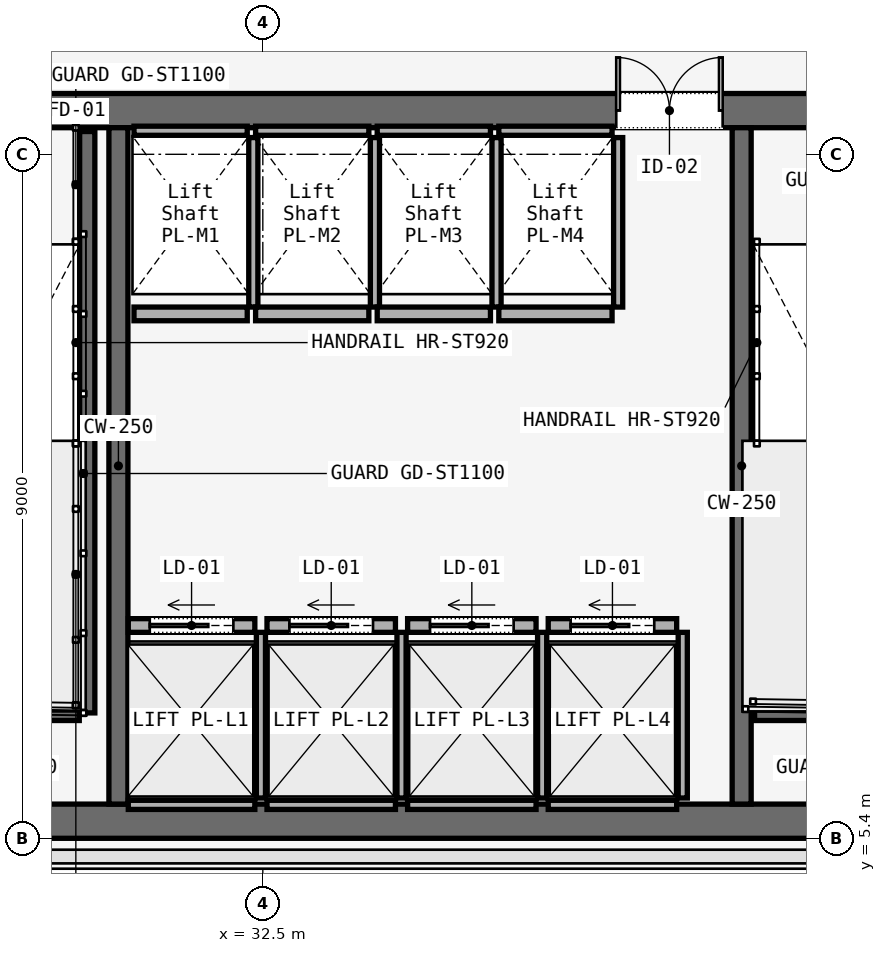
"""IFC4 building model, lengths in metres.
Left out: names, types, materials, properties, quantities, classifications, styles, units other than length and angle.
Written with IfcOpenShell. Run it as: python <this file> out.ifc"""

import sys

from ifc_helpers import new_model, si_unit, direction, frame, frame_2d, origin, place, context, subcontext, project, spatial, rectangle, extrude, element, fill, save


model = new_model("IFC4")
c1 = context("Model", 3, precision=1e-05, world=origin(), true_north=direction((0.0, 1.0)))
c2 = subcontext(c1, "Body", "Model", "MODEL_VIEW")
j1 = project(units=[si_unit("LENGTHUNIT", "METRE"), si_unit("PLANEANGLEUNIT", "RADIAN")], contexts=[c1])
p1 = place(None, origin())
s1 = spatial("IfcSite", under=j1, at=p1, CompositionType="ELEMENT")
p2 = place(p1, origin())
s2 = spatial("IfcBuilding", under=s1, at=p2, CompositionType="ELEMENT")
p3 = place(p2, frame((0.0, 0.0, 74.0)))
s3 = spatial("IfcBuildingStorey", under=s2, at=p3, CompositionType="ELEMENT", Elevation=74.0)
p4 = place(p3, frame((26.45, 14.975, 0.0), z_axis=(0.0, 0.0, 1.0), x_axis=(1.0, 0.0, 0.0)))
e1 = element("IfcWall", 1, at=p4, inside=s3, PredefinedType="SOLIDWALL", context=c2, shape_type="SweptSolid", body=[
    extrude(rectangle(XDim=31.1, YDim=0.45, at=frame_2d((15.55, 0.0))), origin(), (0.0, 0.0, 1.0), 3.58),
])
p5 = place(p4, frame((1.65, 0.0, 0.0)))
e2 = element("IfcOpeningElement", 2, at=p5, cuts=e1, PredefinedType="OPENING", context=c2, shape_type="SweptSolid", body=[
    extrude(rectangle(XDim=1.1, YDim=2.2, at=frame_2d((0.55, 1.1))), frame((0.0, 0.225, 0.0), z_axis=(0.0, -1.0, 0.0), x_axis=(1.0, 0.0, 0.0)), (0.0, 0.0, 1.0), 0.45),
])
p6 = place(p4, frame((13.65, 0.0, 0.0)))
e3 = element("IfcOpeningElement", 3, at=p6, cuts=e1, PredefinedType="OPENING", context=c2, shape_type="SweptSolid", body=[
    extrude(rectangle(XDim=1.1, YDim=2.2, at=frame_2d((0.55, 1.1))), frame((0.0, 0.225, 0.0), z_axis=(0.0, -1.0, 0.0), x_axis=(1.0, 0.0, 0.0)), (0.0, 0.0, 1.0), 0.45),
])
p7 = place(p4, frame((25.55, 0.0, 0.0)))
e4 = element("IfcOpeningElement", 4, at=p7, cuts=e1, PredefinedType="OPENING", context=c2, shape_type="SweptSolid", body=[
    extrude(rectangle(XDim=1.1, YDim=2.2, at=frame_2d((0.55, 1.1))), frame((0.0, 0.225, 0.0), z_axis=(0.0, -1.0, 0.0), x_axis=(1.0, 0.0, 0.0)), (0.0, 0.0, 1.0), 0.45),
])
p8 = place(p4, frame((10.7, 0.0, 0.0)))
e5 = element("IfcOpeningElement", 5, at=p8, cuts=e1, PredefinedType="OPENING", context=c2, shape_type="SweptSolid", body=[
    extrude(rectangle(XDim=1.4, YDim=2.2, at=frame_2d((0.7, 1.1))), frame((0.0, 0.225, 0.0), z_axis=(0.0, -1.0, 0.0), x_axis=(1.0, 0.0, 0.0)), (0.0, 0.0, 1.0), 0.45),
])
p9 = place(p4, frame((19.35, 0.0, 0.0)))
e6 = element("IfcOpeningElement", 6, at=p9, cuts=e1, PredefinedType="OPENING", context=c2, shape_type="SweptSolid", body=[
    extrude(rectangle(XDim=1.1, YDim=2.2, at=frame_2d((0.55, 1.1))), frame((0.0, 0.225, 0.0), z_axis=(0.0, -1.0, 0.0), x_axis=(1.0, 0.0, 0.0)), (0.0, 0.0, 1.0), 0.45),
])
p10 = place(p4, frame((21.4, 0.0, 0.0)))
e7 = element("IfcOpeningElement", 7, at=p10, cuts=e1, PredefinedType="OPENING", context=c2, shape_type="SweptSolid", body=[
    extrude(rectangle(XDim=0.9, YDim=2.1, at=frame_2d((0.45, 1.05))), frame((0.0, 0.225, 0.0), z_axis=(0.0, -1.0, 0.0), x_axis=(1.0, 0.0, 0.0)), (0.0, 0.0, 1.0), 0.45),
])
p11 = place(p4, frame((23.35, 0.0, 0.0)))
e8 = element("IfcOpeningElement", 8, at=p11, cuts=e1, PredefinedType="OPENING", context=c2, shape_type="SweptSolid", body=[
    extrude(rectangle(XDim=1.3, YDim=2.3, at=frame_2d((0.65, 1.15))), frame((0.0, 0.225, 0.0), z_axis=(0.0, -1.0, 0.0), x_axis=(1.0, 0.0, 0.0)), (0.0, 0.0, 1.0), 0.45),
])
p12 = place(p3, frame((26.45, 5.625, 0.0), z_axis=(0.0, 0.0, 1.0), x_axis=(1.0, 0.0, 0.0)))
e9 = element("IfcWall", 9, at=p12, inside=s3, PredefinedType="SOLIDWALL", context=c2, shape_type="SweptSolid", body=[
    extrude(rectangle(XDim=31.1, YDim=0.45, at=frame_2d((15.55, 0.0))), origin(), (0.0, 0.0, 1.0), 3.58),
])
for number, where, z_axis, x_axis in (
    (10, (30.6, 5.85, 0.0), (0.0, 0.0, 1.0), (0.0, 1.0, 0.0)),
    (11, (38.8, 5.85, 0.0), (0.0, 0.0, 1.0), (0.0, 1.0, 0.0)),
):
    element("IfcWall", number, at=place(p3, frame(where, z_axis=z_axis, x_axis=x_axis)), inside=s3, PredefinedType="SOLIDWALL", context=c2, shape_type="SweptSolid", body=[
        extrude(rectangle(XDim=8.9, YDim=0.25, at=frame_2d((4.45, 0.0))), origin(), (0.0, 0.0, 1.0), 3.58),
    ])
p13 = place(p3, frame((30.19, 14.7, 0.0), z_axis=(0.0, 0.0, 1.0), x_axis=(0.0, -1.0, 0.0)))
e12 = element("IfcWall", 12, at=p13, inside=s3, PredefinedType="SOLIDWALL", context=c2, shape_type="SweptSolid", body=[
    extrude(rectangle(XDim=7.65, YDim=0.2, at=frame_2d((3.825, 0.0))), origin(), (0.0, 0.0, 1.0), 3.8),
])
for number, where, z_axis, x_axis in (
    (13, (26.97, 7.05, 0.0), (0.0, 0.0, 1.0), (1.0, 0.0, 0.0)),
    (14, (38.97, 7.05, 0.0), (0.0, 0.0, 1.0), (1.0, 0.0, 0.0)),
):
    element("IfcWall", number, at=place(p3, frame(where, z_axis=z_axis, x_axis=x_axis)), inside=s3, PredefinedType="SOLIDWALL", context=c2, shape_type="SweptSolid", body=[
        extrude(rectangle(XDim=3.115, YDim=0.2, at=frame_2d((1.558, 0.0))), origin(), (0.0, 0.0, 1.0), 3.8),
    ])
p14 = place(p3, frame((30.73, 8.2, 0.0), z_axis=(0.0, 0.0, 1.0), x_axis=(1.0, 0.0, 0.0)))
e15 = element("IfcWall", 15, at=p14, inside=s3, PredefinedType="SOLIDWALL", context=c2, shape_type="SweptSolid", body=[
    extrude(rectangle(XDim=1.665, YDim=0.18, at=frame_2d((0.833, 0.0))), origin(), (0.0, 0.0, 1.0), 2.95),
])
p15 = place(p14, frame((0.282, 0.0, 0.0)))
e16 = element("IfcOpeningElement", 16, at=p15, cuts=e15, PredefinedType="OPENING", context=c2, shape_type="SweptSolid", body=[
    extrude(rectangle(XDim=1.1, YDim=2.2, at=frame_2d((0.55, 1.1))), frame((0.0, 0.09, 0.0), z_axis=(0.0, -1.0, 0.0), x_axis=(1.0, 0.0, 0.0)), (0.0, 0.0, 1.0), 0.18),
])
p16 = place(p3, frame((30.73, 5.84, 0.0), z_axis=(0.0, 0.0, 1.0), x_axis=(1.0, 0.0, 0.0)))
e17 = element("IfcWall", 17, at=p16, inside=s3, PredefinedType="SOLIDWALL", context=c2, shape_type="SweptSolid", body=[
    extrude(rectangle(XDim=1.665, YDim=0.12, at=frame_2d((0.833, 0.0))), origin(), (0.0, 0.0, 1.0), 2.95),
])
p17 = place(p3, frame((32.475, 5.93, 0.0), z_axis=(0.0, 0.0, 1.0), x_axis=(0.0, 1.0, 0.0)))
e18 = element("IfcWall", 18, at=p17, inside=s3, PredefinedType="SOLIDWALL", context=c2, shape_type="SweptSolid", body=[
    extrude(rectangle(XDim=2.18, YDim=0.12, at=frame_2d((1.09, 0.0))), origin(), (0.0, 0.0, 1.0), 2.95),
])
p18 = place(p3, frame((32.555, 8.2, 0.0), z_axis=(0.0, 0.0, 1.0), x_axis=(1.0, 0.0, 0.0)))
e19 = element("IfcWall", 19, at=p18, inside=s3, PredefinedType="SOLIDWALL", context=c2, shape_type="SweptSolid", body=[
    extrude(rectangle(XDim=1.69, YDim=0.18, at=frame_2d((0.845, 0.0))), origin(), (0.0, 0.0, 1.0), 2.95),
])
p19 = place(p18, frame((0.295, 0.0, 0.0)))
e20 = element("IfcOpeningElement", 20, at=p19, cuts=e19, PredefinedType="OPENING", context=c2, shape_type="SweptSolid", body=[
    extrude(rectangle(XDim=1.1, YDim=2.2, at=frame_2d((0.55, 1.1))), frame((0.0, 0.09, 0.0), z_axis=(0.0, -1.0, 0.0), x_axis=(1.0, 0.0, 0.0)), (0.0, 0.0, 1.0), 0.18),
])
p20 = place(p3, frame((32.555, 5.84, 0.0), z_axis=(0.0, 0.0, 1.0), x_axis=(1.0, 0.0, 0.0)))
e21 = element("IfcWall", 21, at=p20, inside=s3, PredefinedType="SOLIDWALL", context=c2, shape_type="SweptSolid", body=[
    extrude(rectangle(XDim=1.69, YDim=0.12, at=frame_2d((0.845, 0.0))), origin(), (0.0, 0.0, 1.0), 2.95),
])
p21 = place(p3, frame((34.325, 5.93, 0.0), z_axis=(0.0, 0.0, 1.0), x_axis=(0.0, 1.0, 0.0)))
e22 = element("IfcWall", 22, at=p21, inside=s3, PredefinedType="SOLIDWALL", context=c2, shape_type="SweptSolid", body=[
    extrude(rectangle(XDim=2.18, YDim=0.12, at=frame_2d((1.09, 0.0))), origin(), (0.0, 0.0, 1.0), 2.95),
])
p22 = place(p3, frame((34.405, 8.2, 0.0), z_axis=(0.0, 0.0, 1.0), x_axis=(1.0, 0.0, 0.0)))
e23 = element("IfcWall", 23, at=p22, inside=s3, PredefinedType="SOLIDWALL", context=c2, shape_type="SweptSolid", body=[
    extrude(rectangle(XDim=1.69, YDim=0.18, at=frame_2d((0.845, 0.0))), origin(), (0.0, 0.0, 1.0), 2.95),
])
p23 = place(p22, frame((0.295, 0.0, 0.0)))
e24 = element("IfcOpeningElement", 24, at=p23, cuts=e23, PredefinedType="OPENING", context=c2, shape_type="SweptSolid", body=[
    extrude(rectangle(XDim=1.1, YDim=2.2, at=frame_2d((0.55, 1.1))), frame((0.0, 0.09, 0.0), z_axis=(0.0, -1.0, 0.0), x_axis=(1.0, 0.0, 0.0)), (0.0, 0.0, 1.0), 0.18),
])
p24 = place(p3, frame((34.405, 5.84, 0.0), z_axis=(0.0, 0.0, 1.0), x_axis=(1.0, 0.0, 0.0)))
e25 = element("IfcWall", 25, at=p24, inside=s3, PredefinedType="SOLIDWALL", context=c2, shape_type="SweptSolid", body=[
    extrude(rectangle(XDim=1.69, YDim=0.12, at=frame_2d((0.845, 0.0))), origin(), (0.0, 0.0, 1.0), 2.95),
])
p25 = place(p3, frame((36.175, 5.93, 0.0), z_axis=(0.0, 0.0, 1.0), x_axis=(0.0, 1.0, 0.0)))
e26 = element("IfcWall", 26, at=p25, inside=s3, PredefinedType="SOLIDWALL", context=c2, shape_type="SweptSolid", body=[
    extrude(rectangle(XDim=2.18, YDim=0.12, at=frame_2d((1.09, 0.0))), origin(), (0.0, 0.0, 1.0), 2.95),
])
p26 = place(p3, frame((36.255, 8.2, 0.0), z_axis=(0.0, 0.0, 1.0), x_axis=(1.0, 0.0, 0.0)))
e27 = element("IfcWall", 27, at=p26, inside=s3, PredefinedType="SOLIDWALL", context=c2, shape_type="SweptSolid", body=[
    extrude(rectangle(XDim=1.69, YDim=0.18, at=frame_2d((0.845, 0.0))), origin(), (0.0, 0.0, 1.0), 2.95),
])
p27 = place(p26, frame((0.295, 0.0, 0.0)))
e28 = element("IfcOpeningElement", 28, at=p27, cuts=e27, PredefinedType="OPENING", context=c2, shape_type="SweptSolid", body=[
    extrude(rectangle(XDim=1.1, YDim=2.2, at=frame_2d((0.55, 1.1))), frame((0.0, 0.09, 0.0), z_axis=(0.0, -1.0, 0.0), x_axis=(1.0, 0.0, 0.0)), (0.0, 0.0, 1.0), 0.18),
])
p28 = place(p3, frame((36.255, 5.84, 0.0), z_axis=(0.0, 0.0, 1.0), x_axis=(1.0, 0.0, 0.0)))
e29 = element("IfcWall", 29, at=p28, inside=s3, PredefinedType="SOLIDWALL", context=c2, shape_type="SweptSolid", body=[
    extrude(rectangle(XDim=1.69, YDim=0.12, at=frame_2d((0.845, 0.0))), origin(), (0.0, 0.0, 1.0), 2.95),
])
p29 = place(p3, frame((38.025, 5.93, 0.0), z_axis=(0.0, 0.0, 1.0), x_axis=(0.0, 1.0, 0.0)))
e30 = element("IfcWall", 30, at=p29, inside=s3, PredefinedType="SOLIDWALL", context=c2, shape_type="SweptSolid", body=[
    extrude(rectangle(XDim=2.18, YDim=0.12, at=frame_2d((1.09, 0.0))), origin(), (0.0, 0.0, 1.0), 2.95),
])
p30 = place(p3, frame((30.805, 12.3, 0.0), z_axis=(0.0, 0.0, 1.0), x_axis=(1.0, 0.0, 0.0)))
e31 = element("IfcWall", 31, at=p30, inside=s3, PredefinedType="SOLIDWALL", context=c2, shape_type="SweptSolid", body=[
    extrude(rectangle(XDim=1.49, YDim=0.18, at=frame_2d((0.745, 0.0))), origin(), (0.0, 0.0, 1.0), 2.95),
])
p31 = place(p3, frame((30.805, 14.71, 0.0), z_axis=(0.0, 0.0, 1.0), x_axis=(1.0, 0.0, 0.0)))
e32 = element("IfcWall", 32, at=p31, inside=s3, PredefinedType="SOLIDWALL", context=c2, shape_type="SweptSolid", body=[
    extrude(rectangle(XDim=1.49, YDim=0.12, at=frame_2d((0.745, 0.0))), origin(), (0.0, 0.0, 1.0), 2.95),
])
p32 = place(p3, frame((32.375, 12.39, 0.0), z_axis=(0.0, 0.0, 1.0), x_axis=(0.0, 1.0, 0.0)))
e33 = element("IfcWall", 33, at=p32, inside=s3, PredefinedType="SOLIDWALL", context=c2, shape_type="SweptSolid", body=[
    extrude(rectangle(XDim=2.23, YDim=0.12, at=frame_2d((1.115, 0.0))), origin(), (0.0, 0.0, 1.0), 2.95),
])
p33 = place(p3, frame((32.405, 12.3, 0.0), z_axis=(0.0, 0.0, 1.0), x_axis=(1.0, 0.0, 0.0)))
e34 = element("IfcWall", 34, at=p33, inside=s3, PredefinedType="SOLIDWALL", context=c2, shape_type="SweptSolid", body=[
    extrude(rectangle(XDim=1.49, YDim=0.18, at=frame_2d((0.745, 0.0))), origin(), (0.0, 0.0, 1.0), 2.95),
])
p34 = place(p3, frame((32.405, 14.71, 0.0), z_axis=(0.0, 0.0, 1.0), x_axis=(1.0, 0.0, 0.0)))
e35 = element("IfcWall", 35, at=p34, inside=s3, PredefinedType="SOLIDWALL", context=c2, shape_type="SweptSolid", body=[
    extrude(rectangle(XDim=1.49, YDim=0.12, at=frame_2d((0.745, 0.0))), origin(), (0.0, 0.0, 1.0), 2.95),
])
p35 = place(p3, frame((33.975, 12.39, 0.0), z_axis=(0.0, 0.0, 1.0), x_axis=(0.0, 1.0, 0.0)))
e36 = element("IfcWall", 36, at=p35, inside=s3, PredefinedType="SOLIDWALL", context=c2, shape_type="SweptSolid", body=[
    extrude(rectangle(XDim=2.23, YDim=0.12, at=frame_2d((1.115, 0.0))), origin(), (0.0, 0.0, 1.0), 2.95),
])
p36 = place(p3, frame((34.005, 12.3, 0.0), z_axis=(0.0, 0.0, 1.0), x_axis=(1.0, 0.0, 0.0)))
e37 = element("IfcWall", 37, at=p36, inside=s3, PredefinedType="SOLIDWALL", context=c2, shape_type="SweptSolid", body=[
    extrude(rectangle(XDim=1.49, YDim=0.18, at=frame_2d((0.745, 0.0))), origin(), (0.0, 0.0, 1.0), 2.95),
])
p37 = place(p3, frame((34.005, 14.71, 0.0), z_axis=(0.0, 0.0, 1.0), x_axis=(1.0, 0.0, 0.0)))
e38 = element("IfcWall", 38, at=p37, inside=s3, PredefinedType="SOLIDWALL", context=c2, shape_type="SweptSolid", body=[
    extrude(rectangle(XDim=1.49, YDim=0.12, at=frame_2d((0.745, 0.0))), origin(), (0.0, 0.0, 1.0), 2.95),
])
p38 = place(p3, frame((35.575, 12.39, 0.0), z_axis=(0.0, 0.0, 1.0), x_axis=(0.0, 1.0, 0.0)))
e39 = element("IfcWall", 39, at=p38, inside=s3, PredefinedType="SOLIDWALL", context=c2, shape_type="SweptSolid", body=[
    extrude(rectangle(XDim=2.23, YDim=0.12, at=frame_2d((1.115, 0.0))), origin(), (0.0, 0.0, 1.0), 2.95),
])
p39 = place(p3, frame((35.605, 12.3, 0.0), z_axis=(0.0, 0.0, 1.0), x_axis=(1.0, 0.0, 0.0)))
e40 = element("IfcWall", 40, at=p39, inside=s3, PredefinedType="SOLIDWALL", context=c2, shape_type="SweptSolid", body=[
    extrude(rectangle(XDim=1.49, YDim=0.18, at=frame_2d((0.745, 0.0))), origin(), (0.0, 0.0, 1.0), 2.95),
])
p40 = place(p3, frame((35.605, 14.71, 0.0), z_axis=(0.0, 0.0, 1.0), x_axis=(1.0, 0.0, 0.0)))
e41 = element("IfcWall", 41, at=p40, inside=s3, PredefinedType="SOLIDWALL", context=c2, shape_type="SweptSolid", body=[
    extrude(rectangle(XDim=1.49, YDim=0.12, at=frame_2d((0.745, 0.0))), origin(), (0.0, 0.0, 1.0), 2.95),
])
p41 = place(p3, frame((37.175, 12.39, 0.0), z_axis=(0.0, 0.0, 1.0), x_axis=(0.0, 1.0, 0.0)))
e42 = element("IfcWall", 42, at=p41, inside=s3, PredefinedType="SOLIDWALL", context=c2, shape_type="SweptSolid", body=[
    extrude(rectangle(XDim=2.23, YDim=0.12, at=frame_2d((1.115, 0.0))), origin(), (0.0, 0.0, 1.0), 2.95),
])
p42 = place(p8, origin())
e43 = element("IfcDoor", 43, at=p42, inside=s3, OperationType="DOUBLE_DOOR_SINGLE_SWING", PredefinedType="DOOR", context=c2, shape_type="SweptSolid", body=[
    extrude(rectangle(XDim=1.4, YDim=2.2, at=frame_2d((0.7, 1.1))), frame((0.0, 0.025, 0.0), z_axis=(0.0, -1.0, 0.0), x_axis=(1.0, 0.0, 0.0)), (0.0, 0.0, 1.0), 0.05),
])
fill(e5, e43)
p43 = place(p15, origin())
e44 = element("IfcDoor", 44, at=p43, inside=s3, OperationType="SLIDING_TO_LEFT", PredefinedType="DOOR", context=c2, shape_type="SweptSolid", body=[
    extrude(rectangle(XDim=1.1, YDim=2.2, at=frame_2d((0.55, 1.1))), frame((0.0, 0.025, 0.0), z_axis=(0.0, -1.0, 0.0), x_axis=(1.0, 0.0, 0.0)), (0.0, 0.0, 1.0), 0.05),
])
fill(e16, e44)
p44 = place(p19, origin())
e45 = element("IfcDoor", 45, at=p44, inside=s3, OperationType="SLIDING_TO_LEFT", PredefinedType="DOOR", context=c2, shape_type="SweptSolid", body=[
    extrude(rectangle(XDim=1.1, YDim=2.2, at=frame_2d((0.55, 1.1))), frame((0.0, 0.025, 0.0), z_axis=(0.0, -1.0, 0.0), x_axis=(1.0, 0.0, 0.0)), (0.0, 0.0, 1.0), 0.05),
])
fill(e20, e45)
p45 = place(p23, origin())
e46 = element("IfcDoor", 46, at=p45, inside=s3, OperationType="SLIDING_TO_LEFT", PredefinedType="DOOR", context=c2, shape_type="SweptSolid", body=[
    extrude(rectangle(XDim=1.1, YDim=2.2, at=frame_2d((0.55, 1.1))), frame((0.0, 0.025, 0.0), z_axis=(0.0, -1.0, 0.0), x_axis=(1.0, 0.0, 0.0)), (0.0, 0.0, 1.0), 0.05),
])
fill(e24, e46)
p46 = place(p27, origin())
e47 = element("IfcDoor", 47, at=p46, inside=s3, OperationType="SLIDING_TO_LEFT", PredefinedType="DOOR", context=c2, shape_type="SweptSolid", body=[
    extrude(rectangle(XDim=1.1, YDim=2.2, at=frame_2d((0.55, 1.1))), frame((0.0, 0.025, 0.0), z_axis=(0.0, -1.0, 0.0), x_axis=(1.0, 0.0, 0.0)), (0.0, 0.0, 1.0), 0.05),
])
fill(e28, e47)
save(model, sys.argv[1])
